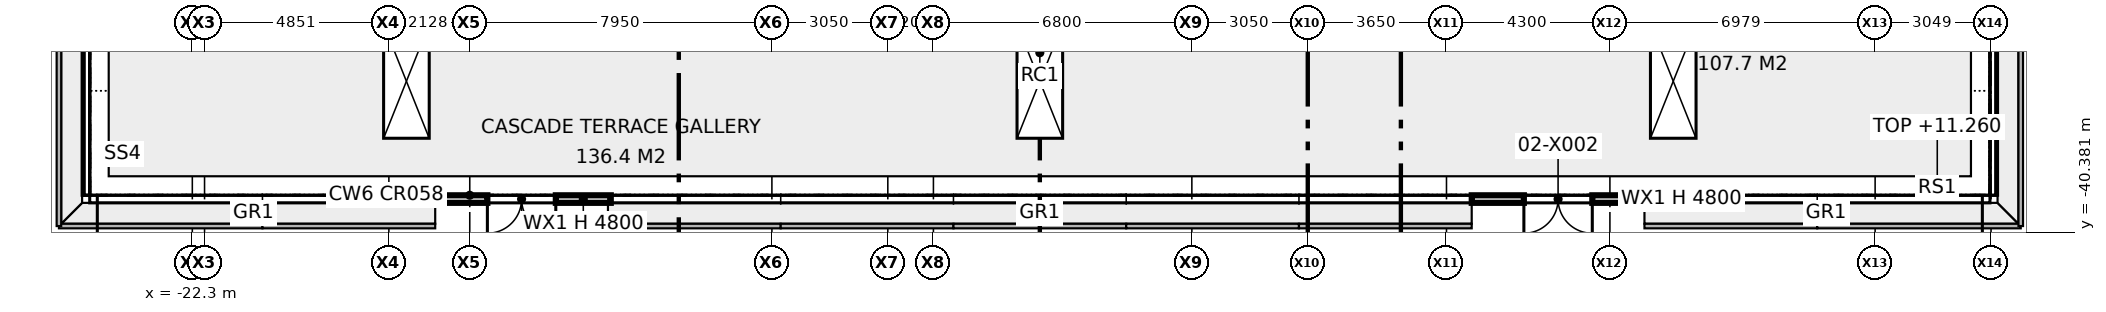
"""IFC4 building model, lengths in metres.
Left out: names, types, materials, properties, quantities, classifications, styles, units other than length and angle.
Written with IfcOpenShell. Run it as: python <this file> out.ifc"""

import sys

from ifc_helpers import new_model, si_unit, direction, frame, frame_2d, origin, place, context, subcontext, project, spatial, rectangle, extrude, element, fill, save


model = new_model("IFC4")
c1 = context("Model", 3, precision=1e-05, world=origin(), true_north=direction((0.0, 1.0)))
c2 = subcontext(c1, "Body", "Model", "MODEL_VIEW")
j1 = project(units=[si_unit("LENGTHUNIT", "METRE"), si_unit("PLANEANGLEUNIT", "RADIAN")], contexts=[c1])
p1 = place(None, origin())
s1 = spatial("IfcSite", under=j1, at=p1, CompositionType="ELEMENT")
p2 = place(p1, origin())
s2 = spatial("IfcBuilding", under=s1, at=p2, CompositionType="ELEMENT")
p3 = place(p2, frame((0.0, 0.0, 6.5)))
s3 = spatial("IfcBuildingStorey", under=s2, at=p3, CompositionType="ELEMENT", Elevation=6.5)
p4 = place(p3, frame((-15.909, -39.5, 0.0), z_axis=(0.0, 0.0, 1.0), x_axis=(1.0, 0.0, 0.0)))
e1 = element("IfcWall", 1, at=p4, inside=s3, PredefinedType="STANDARD", context=c2, shape_type="SweptSolid", body=[
    extrude(rectangle(XDim=4.621, YDim=0.2, at=frame_2d((2.31, 0.0))), origin(), (0.0, 0.0, 1.0), 4.8),
])
p5 = place(p4, frame((1.373, 0.0, 0.0)))
e2 = element("IfcOpeningElement", 2, at=p5, cuts=e1, PredefinedType="OPENING", context=c2, shape_type="SweptSolid", body=[
    extrude(rectangle(XDim=1.8, YDim=2.1, at=frame_2d((0.9, 1.05))), frame((0.0, 0.11, 0.0), z_axis=(0.0, -1.0, 0.0), x_axis=(1.0, 0.0, 0.0)), (0.0, 0.0, 1.0), 0.22),
])
p6 = place(p3, frame((11.364, -39.5, 0.0), z_axis=(0.0, 0.0, 1.0), x_axis=(1.0, 0.0, 0.0)))
e3 = element("IfcWall", 3, at=p6, inside=s3, PredefinedType="STANDARD", context=c2, shape_type="SweptSolid", body=[
    extrude(rectangle(XDim=4.621, YDim=0.2, at=frame_2d((2.31, 0.0))), origin(), (0.0, 0.0, 1.0), 4.8),
])
p7 = place(p6, frame((1.373, 0.0, 0.0)))
e4 = element("IfcOpeningElement", 4, at=p7, cuts=e3, PredefinedType="OPENING", context=c2, shape_type="SweptSolid", body=[
    extrude(rectangle(XDim=1.8, YDim=2.1, at=frame_2d((0.9, 1.05))), frame((0.0, 0.11, 0.0), z_axis=(0.0, -1.0, 0.0), x_axis=(1.0, 0.0, 0.0)), (0.0, 0.0, 1.0), 0.22),
])
p8 = place(p5, frame((1.8, 0.0, 0.0), z_axis=(0.0, 0.0, 1.0), x_axis=(-1.0, 0.0, 0.0)))
e5 = element("IfcDoor", 5, at=p8, inside=s3, OperationType="DOUBLE_DOOR_DOUBLE_SWING", PredefinedType="DOOR", context=c2, shape_type="SweptSolid", body=[
    extrude(rectangle(XDim=1.8, YDim=2.1, at=frame_2d((0.9, 1.05))), frame((0.0, 0.025, 0.0), z_axis=(0.0, -1.0, 0.0), x_axis=(1.0, 0.0, 0.0)), (0.0, 0.0, 1.0), 0.05),
])
fill(e2, e5)
p9 = place(p7, frame((1.8, 0.0, 0.0), z_axis=(0.0, 0.0, 1.0), x_axis=(-1.0, 0.0, 0.0)))
e6 = element("IfcDoor", 6, at=p9, inside=s3, OperationType="DOUBLE_DOOR_DOUBLE_SWING", PredefinedType="DOOR", context=c2, shape_type="SweptSolid", body=[
    extrude(rectangle(XDim=1.8, YDim=2.1, at=frame_2d((0.9, 1.05))), frame((0.0, 0.025, 0.0), z_axis=(0.0, -1.0, 0.0), x_axis=(1.0, 0.0, 0.0)), (0.0, 0.0, 1.0), 0.05),
])
fill(e4, e6)
save(model, sys.argv[1])
